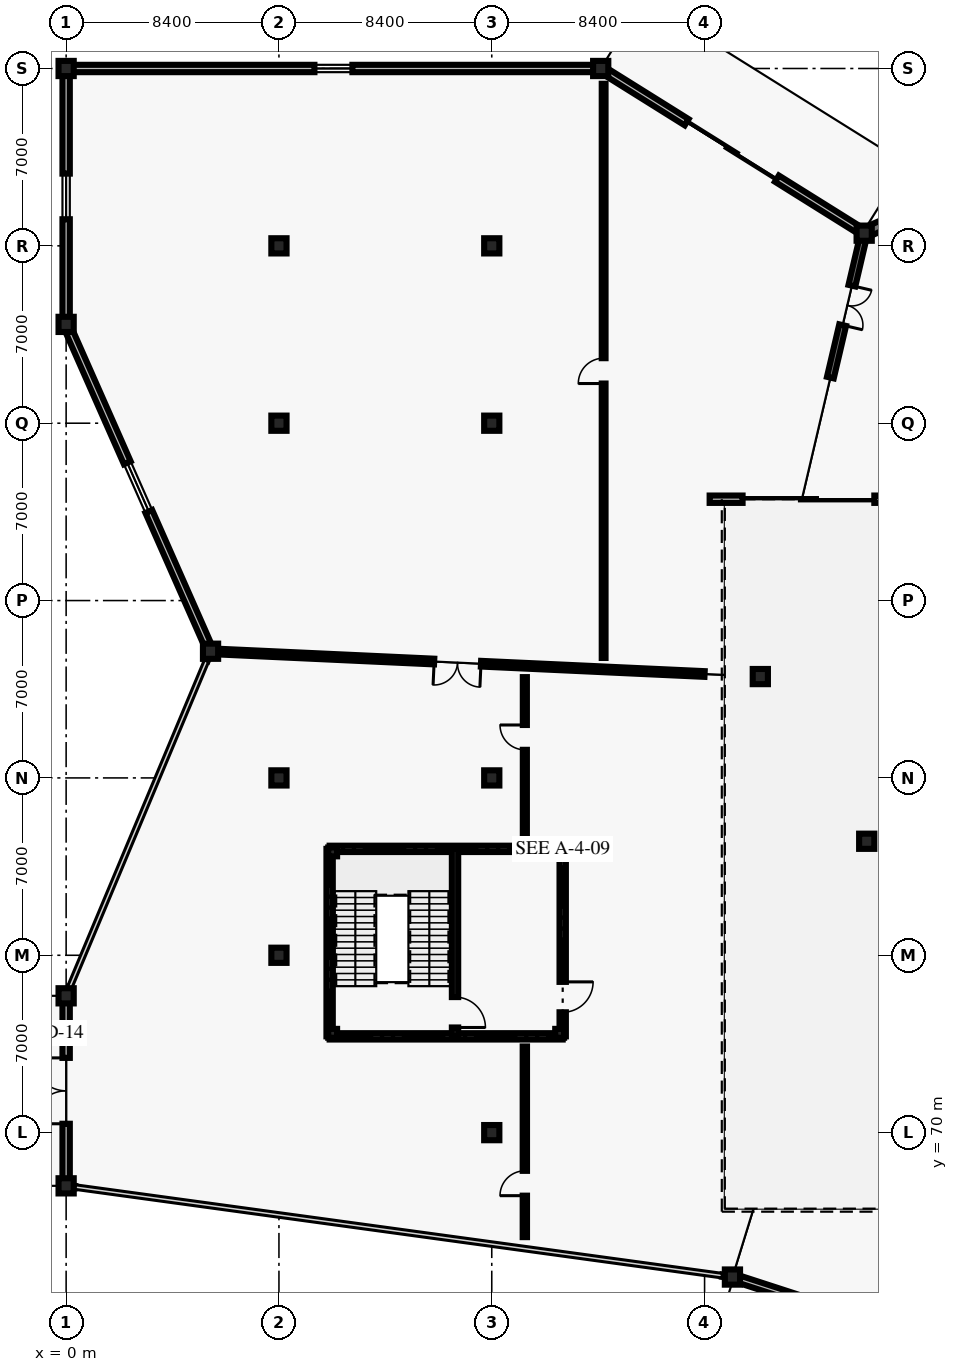
"""IFC4 building model, lengths in metres.
Left out: names, types, materials, properties, quantities, classifications, styles, units other than length and angle.
Written with IfcOpenShell. Run it as: python <this file> out.ifc"""

import sys

from ifc_helpers import new_model, si_unit, direction, frame, frame_2d, origin, origin_2d, place, context, subcontext, project, spatial, rectangle, i_section, extrude, element, fill, save


model = new_model("IFC4")
c1 = context("Model", 3, precision=1e-05, world=origin(), true_north=direction((0.0, 1.0)))
c2 = subcontext(c1, "Body", "Model", "MODEL_VIEW")
j1 = project(units=[si_unit("LENGTHUNIT", "METRE"), si_unit("PLANEANGLEUNIT", "RADIAN")], contexts=[c1])
p1 = place(None, origin())
s1 = spatial("IfcSite", under=j1, at=p1, CompositionType="ELEMENT")
p2 = place(p1, origin())
s2 = spatial("IfcBuilding", under=s1, at=p2, CompositionType="ELEMENT")
p3 = place(p2, origin())
s3 = spatial("IfcBuildingStorey", under=s2, at=p3, CompositionType="ELEMENT", Elevation=0.0)
for number, where, z_axis, x_axis in (
    (1, (0.0, 67.9, 0.0), (0.0, 0.0, 1.0), (1.0, 0.0, 0.0)),
    (2, (0.0, 75.4, 0.0), (0.0, 0.0, 1.0), (1.0, 0.0, 0.0)),
    (3, (0.0, 101.9, 0.0), (0.0, 0.0, 1.0), (1.0, 0.0, 0.0)),
    (4, (0.0, 112.0, 0.0), (0.0, 0.0, 1.0), (1.0, 0.0, 0.0)),
    (5, (5.7, 89.0, 0.0), (0.0, 0.0, 1.0), (1.0, 0.0, 0.0)),
    (6, (21.1, 112.0, 0.0), (0.0, 0.0, 1.0), (1.0, 0.0, 0.0)),
    (7, (26.3, 64.3, 0.0), (0.0, 0.0, 1.0), (1.0, 0.0, 0.0)),
    (8, (27.4, 88.0, 0.0), (0.0, 0.0, 1.0), (1.0, 0.0, 0.0)),
    (9, (31.5, 105.5, 0.0), (0.0, 0.0, 1.0), (1.0, 0.0, 0.0)),
    (10, (31.6, 81.5, 0.0), (0.0, 0.0, 1.0), (1.0, 0.0, 0.0)),
    (11, (8.4, 77.0, 0.0), (0.0, 0.0, 1.0), (1.0, 0.0, 0.0)),
    (12, (8.4, 84.0, 0.0), (0.0, 0.0, 1.0), (1.0, 0.0, 0.0)),
    (13, (16.8, 70.0, 0.0), (0.0, 0.0, 1.0), (1.0, 0.0, 0.0)),
    (14, (16.8, 84.0, 0.0), (0.0, 0.0, 1.0), (1.0, 0.0, 0.0)),
    (15, (8.4, 98.0, 0.0), (0.0, 0.0, 1.0), (1.0, 0.0, 0.0)),
    (16, (8.4, 105.0, 0.0), (0.0, 0.0, 1.0), (1.0, 0.0, 0.0)),
    (17, (16.8, 98.0, 0.0), (0.0, 0.0, 1.0), (1.0, 0.0, 0.0)),
    (18, (16.8, 105.0, 0.0), (0.0, 0.0, 1.0), (1.0, 0.0, 0.0)),
):
    element("IfcColumn", number, at=place(p3, frame(where, z_axis=z_axis, x_axis=x_axis)), inside=s3, PredefinedType="COLUMN", context=c2, shape_type="SweptSolid", body=[
        extrude(rectangle(XDim=0.6, YDim=0.6, at=origin_2d()), origin(), (0.0, 0.0, 1.0), 5.4),
    ])
for number, where, z_axis, x_axis in (
    (19, (10.52, 73.92, 0.0), (0.0, 0.0, 1.0), (1.0, 0.0, 0.0)),
    (20, (19.48, 73.92, 0.0), (0.0, 0.0, 1.0), (1.0, 0.0, 0.0)),
    (21, (19.48, 81.08, 0.0), (0.0, 0.0, 1.0), (1.0, 0.0, 0.0)),
    (22, (10.52, 81.08, 0.0), (0.0, 0.0, 1.0), (1.0, 0.0, 0.0)),
):
    element("IfcColumn", number, at=place(p3, frame(where, z_axis=z_axis, x_axis=x_axis)), inside=s3, PredefinedType="COLUMN", context=c2, shape_type="SweptSolid", body=[
        extrude(i_section(OverallWidth=0.35, OverallDepth=0.35, WebThickness=0.02, FlangeThickness=0.028, at=origin_2d()), origin(), (0.0, 0.0, 1.0), 5.4),
    ])
p4 = place(p3, frame((49.943, 56.619, 0.0), z_axis=(0.0, 0.0, 1.0), x_axis=(-0.951074357174, 0.308962080402, 0.0)))
e23 = element("IfcWall", 23, at=p4, inside=s3, PredefinedType="SOLIDWALL", context=c2, shape_type="SweptSolid", body=[
    extrude(rectangle(XDim=24.8, YDim=0.29, at=frame_2d((12.4, 0.0))), origin(), (0.0, 0.0, 1.0), 4.22),
])
p5 = place(p4, frame((11.124, 0.0, 0.0)))
e24 = element("IfcOpeningElement", 24, at=p5, cuts=e23, PredefinedType="OPENING", context=c2, shape_type="SweptSolid", body=[
    extrude(rectangle(XDim=2.55, YDim=2.5, at=frame_2d((1.275, 1.25))), frame((0.0, 0.155, 0.0), z_axis=(0.0, -1.0, 0.0), x_axis=(1.0, 0.0, 0.0)), (0.0, 0.0, 1.0), 0.31),
])
p6 = place(p3, frame((31.555, 105.524, 0.0), z_axis=(0.0, 0.0, 1.0), x_axis=(0.915561631163, 0.402177696474, 0.0)))
e25 = element("IfcWall", 25, at=p6, inside=s3, PredefinedType="SOLIDWALL", context=c2, shape_type="SweptSolid", body=[
    extrude(rectangle(XDim=11.627, YDim=0.4, at=frame_2d((5.813, 0.0))), origin(), (0.0, 0.0, 1.0), 4.22),
])
p7 = place(p3, frame((0.0, 67.9, 0.0), z_axis=(0.0, 0.0, 1.0), x_axis=(0.0, 1.0, 0.0)))
e26 = element("IfcWall", 26, at=p7, inside=s3, PredefinedType="SOLIDWALL", context=c2, shape_type="SweptSolid", body=[
    extrude(rectangle(XDim=7.5, YDim=0.29, at=frame_2d((3.75, 0.0))), origin(), (0.0, 0.0, 1.0), 4.22),
])
p8 = place(p7, frame((2.45, 0.0, 0.0)))
e27 = element("IfcOpeningElement", 27, at=p8, cuts=e26, PredefinedType="OPENING", context=c2, shape_type="SweptSolid", body=[
    extrude(rectangle(XDim=2.6, YDim=2.55, at=frame_2d((1.3, 1.275))), frame((0.0, 0.155, 0.0), z_axis=(0.0, -1.0, 0.0), x_axis=(1.0, 0.0, 0.0)), (0.0, 0.0, 1.0), 0.31),
])
for number, where, z_axis, x_axis in (
    (28, (26.199, 64.314, 0.0), (0.0, 0.0, 1.0), (-0.991, 0.133, 0.0)),
    (29, (0.347, 67.853, 0.0), (0.0, 0.0, 1.0), (-0.991, 0.133, 0.0)),
):
    element("IfcWall", number, at=place(p3, frame(where, z_axis=z_axis, x_axis=x_axis)), inside=s3, PredefinedType="SOLIDWALL", context=c2, shape_type="SweptSolid", body=[
        extrude(rectangle(XDim=0.308, YDim=0.095, at=frame_2d((0.154, 0.0))), origin(), (0.0, 0.0, 1.0), 4.22),
    ])
for number, where, z_axis, x_axis in (
    (30, (0.016, 75.439, 0.0), (0.0, 0.0, 1.0), (0.386, 0.922, 0.0)),
    (31, (5.542, 88.622, 0.0), (0.0, 0.0, 1.0), (0.386, 0.922, 0.0)),
):
    element("IfcWall", number, at=place(p3, frame(where, z_axis=z_axis, x_axis=x_axis)), inside=s3, PredefinedType="SOLIDWALL", context=c2, shape_type="SweptSolid", body=[
        extrude(rectangle(XDim=0.308, YDim=0.095, at=frame_2d((0.154, 0.0))), origin(), (0.0, 0.0, 1.0), 4.22),
    ])
p9 = place(p3, frame((21.1, 112.0, 0.0), z_axis=(0.0, 0.0, 1.0), x_axis=(0.84799942789, -0.529997141784, 0.0)))
e32 = element("IfcWall", 32, at=p9, inside=s3, PredefinedType="SOLIDWALL", context=c2, shape_type="SweptSolid", body=[
    extrude(rectangle(XDim=12.204, YDim=0.29, at=frame_2d((6.102, 0.0))), origin(), (0.0, 0.0, 1.0), 4.22),
])
p10 = place(p9, frame((4.002, 0.0, 0.0)))
e33 = element("IfcOpeningElement", 33, at=p10, cuts=e32, PredefinedType="OPENING", context=c2, shape_type="SweptSolid", body=[
    extrude(rectangle(XDim=4.2, YDim=3.92, at=frame_2d((2.1, 1.96))), frame((0.0, 0.155, 0.0), z_axis=(0.0, -1.0, 0.0), x_axis=(1.0, 0.0, 0.0)), (0.0, 0.0, 1.0), 0.31),
])
p11 = place(p3, frame((0.0, 112.0, 0.0), z_axis=(0.0, 0.0, 1.0), x_axis=(1.0, 0.0, 0.0)))
e34 = element("IfcWall", 34, at=p11, inside=s3, PredefinedType="SOLIDWALL", context=c2, shape_type="SweptSolid", body=[
    extrude(rectangle(XDim=21.1, YDim=0.29, at=frame_2d((10.55, 0.0))), origin(), (0.0, 0.0, 1.0), 4.22),
])
p12 = place(p11, frame((9.8, 0.0, 0.95)))
e35 = element("IfcOpeningElement", 35, at=p12, cuts=e34, PredefinedType="OPENING", context=c2, shape_type="SweptSolid", body=[
    extrude(rectangle(XDim=1.5, YDim=1.8, at=frame_2d((0.75, 0.9))), frame((0.0, 0.155, 0.0), z_axis=(0.0, -1.0, 0.0), x_axis=(1.0, 0.0, 0.0)), (0.0, 0.0, 1.0), 0.31),
])
p13 = place(p3, frame((0.0, 101.9, 0.0), z_axis=(0.0, 0.0, 1.0), x_axis=(0.0, 1.0, 0.0)))
e36 = element("IfcWall", 36, at=p13, inside=s3, PredefinedType="SOLIDWALL", context=c2, shape_type="SweptSolid", body=[
    extrude(rectangle(XDim=10.1, YDim=0.29, at=frame_2d((5.05, 0.0))), origin(), (0.0, 0.0, 1.0), 4.22),
])
p14 = place(p13, frame((4.15, 0.0, 0.95)))
e37 = element("IfcOpeningElement", 37, at=p14, cuts=e36, PredefinedType="OPENING", context=c2, shape_type="SweptSolid", body=[
    extrude(rectangle(XDim=1.8, YDim=1.8, at=frame_2d((0.9, 0.9))), frame((0.0, 0.155, 0.0), z_axis=(0.0, -1.0, 0.0), x_axis=(1.0, 0.0, 0.0)), (0.0, 0.0, 1.0), 0.31),
])
p15 = place(p3, frame((5.676, 89.055, 0.0), z_axis=(0.0, 0.0, 1.0), x_axis=(-0.404184143846, 0.914677636035, 0.0)))
e38 = element("IfcWall", 38, at=p15, inside=s3, PredefinedType="SOLIDWALL", context=c2, shape_type="SweptSolid", body=[
    extrude(rectangle(XDim=14.043, YDim=0.29, at=frame_2d((7.021, 0.0))), origin(), (0.0, 0.0, 1.0), 4.22),
])
p16 = place(p15, frame((5.971, 0.0, 0.95)))
e39 = element("IfcOpeningElement", 39, at=p16, cuts=e38, PredefinedType="OPENING", context=c2, shape_type="SweptSolid", body=[
    extrude(rectangle(XDim=2.1, YDim=1.8, at=frame_2d((1.05, 0.9))), frame((0.0, 0.155, 0.0), z_axis=(0.0, -1.0, 0.0), x_axis=(1.0, 0.0, 0.0)), (0.0, 0.0, 1.0), 0.31),
])
p17 = place(p3, frame((33.0, 95.0, 0.0), z_axis=(0.0, 0.0, 1.0), x_axis=(-1.0, 0.0, 0.0)))
e40 = element("IfcWall", 40, at=p17, inside=s3, PredefinedType="SOLIDWALL", context=c2, shape_type="SweptSolid", body=[
    extrude(rectangle(XDim=7.6, YDim=0.29, at=frame_2d((3.8, 0.0))), origin(), (0.0, 0.0, 1.0), 3.8),
])
p18 = place(p17, frame((1.1, 0.0, 0.0)))
e41 = element("IfcOpeningElement", 41, at=p18, cuts=e40, PredefinedType="OPENING", context=c2, shape_type="SweptSolid", body=[
    extrude(rectangle(XDim=5.2, YDim=2.8, at=frame_2d((2.6, 1.4))), frame((0.0, 0.155, 0.0), z_axis=(0.0, -1.0, 0.0), x_axis=(1.0, 0.0, 0.0)), (0.0, 0.0, 1.0), 0.31),
])
p19 = place(p3, frame((31.5, 105.5, 0.0), z_axis=(0.0, 0.0, 1.0), x_axis=(-0.228035044918, -0.973652924963, 0.0)))
e42 = element("IfcWall", 42, at=p19, inside=s3, PredefinedType="SOLIDWALL", context=c2, shape_type="SweptSolid", body=[
    extrude(rectangle(XDim=5.854, YDim=0.275, at=frame_2d((2.927, 0.0))), origin(), (0.0, 0.0, 1.0), 4.62),
])
p20 = place(p19, frame((2.127, 0.0, 0.0)))
e43 = element("IfcOpeningElement", 43, at=p20, cuts=e42, PredefinedType="OPENING", context=c2, shape_type="SweptSolid", body=[
    extrude(rectangle(XDim=1.6, YDim=2.45, at=frame_2d((0.8, 1.225))), frame((0.0, 0.147, 0.0), z_axis=(0.0, -1.0, 0.0), x_axis=(1.0, 0.0, 0.0)), (0.0, 0.0, 1.0), 0.295),
])
p21 = place(p3, frame((25.2, 88.101, 0.0), z_axis=(0.0, 0.0, 1.0), x_axis=(-0.998939142773, 0.046049853812, 0.0)))
e44 = element("IfcWall", 44, at=p21, inside=s3, PredefinedType="SOLIDWALL", context=c2, shape_type="SweptSolid", body=[
    extrude(rectangle(XDim=19.521, YDim=0.225, at=frame_2d((9.76, 0.0))), origin(), (0.0, 0.0, 1.0), 4.62),
])
p22 = place(p21, frame((8.835, 0.0, 0.0)))
e45 = element("IfcOpeningElement", 45, at=p22, cuts=e44, PredefinedType="OPENING", context=c2, shape_type="SweptSolid", body=[
    extrude(rectangle(XDim=1.85, YDim=2.4, at=frame_2d((0.925, 1.2))), frame((0.0, 0.123, 0.0), z_axis=(0.0, -1.0, 0.0), x_axis=(1.0, 0.0, 0.0)), (0.0, 0.0, 1.0), 0.245),
])
p23 = place(p3, frame((18.106, 65.876, 0.0), z_axis=(0.0, 0.0, 1.0), x_axis=(0.0, 1.0, 0.0)))
e46 = element("IfcWall", 46, at=p23, inside=s3, PredefinedType="PARTITIONING", context=c2, shape_type="SweptSolid", body=[
    extrude(rectangle(XDim=7.524, YDim=0.17, at=frame_2d((3.762, 0.0))), origin(), (0.0, 0.0, 1.0), 3.92),
])
p24 = place(p23, frame((1.636, 0.0, 0.0)))
e47 = element("IfcOpeningElement", 47, at=p24, cuts=e46, PredefinedType="OPENING", context=c2, shape_type="SweptSolid", body=[
    extrude(rectangle(XDim=0.98, YDim=2.15, at=frame_2d((0.49, 1.075))), frame((0.0, 0.095, 0.0), z_axis=(0.0, -1.0, 0.0), x_axis=(1.0, 0.0, 0.0)), (0.0, 0.0, 1.0), 0.19),
])
p25 = place(p3, frame((18.106, 81.6, 0.0), z_axis=(0.0, 0.0, 1.0), x_axis=(0.0, 1.0, 0.0)))
e48 = element("IfcWall", 48, at=p25, inside=s3, PredefinedType="PARTITIONING", context=c2, shape_type="SweptSolid", body=[
    extrude(rectangle(XDim=6.378, YDim=0.16, at=frame_2d((3.189, 0.0))), origin(), (0.0, 0.0, 1.0), 3.92),
])
p26 = place(p25, frame((3.509, 0.0, 0.0)))
e49 = element("IfcOpeningElement", 49, at=p26, cuts=e48, PredefinedType="OPENING", context=c2, shape_type="SweptSolid", body=[
    extrude(rectangle(XDim=0.98, YDim=2.15, at=frame_2d((0.49, 1.075))), frame((0.0, 0.09, 0.0), z_axis=(0.0, -1.0, 0.0), x_axis=(1.0, 0.0, 0.0)), (0.0, 0.0, 1.0), 0.18),
])
p27 = place(p3, frame((21.216, 88.735, 0.0), z_axis=(0.0, 0.0, 1.0), x_axis=(0.0, 1.0, 0.0)))
e50 = element("IfcWall", 50, at=p27, inside=s3, PredefinedType="PARTITIONING", context=c2, shape_type="SweptSolid", body=[
    extrude(rectangle(XDim=22.662, YDim=0.15, at=frame_2d((11.331, 0.0))), origin(), (0.0, 0.0, 1.0), 3.92),
])
p28 = place(p27, frame((10.831, 0.0, 0.0)))
e51 = element("IfcOpeningElement", 51, at=p28, cuts=e50, PredefinedType="OPENING", context=c2, shape_type="SweptSolid", body=[
    extrude(rectangle(XDim=1.0, YDim=2.15, at=frame_2d((0.5, 1.075))), frame((0.0, 0.085, 0.0), z_axis=(0.0, -1.0, 0.0), x_axis=(1.0, 0.0, 0.0)), (0.0, 0.0, 1.0), 0.17),
])
p29 = place(p3, frame((10.4, 73.8, 0.0), z_axis=(0.0, 0.0, 1.0), x_axis=(0.0, 1.0, 0.0)))
e52 = element("IfcWall", 52, at=p29, inside=s3, PredefinedType="SHEAR", context=c2, shape_type="SweptSolid", body=[
    extrude(rectangle(XDim=7.4, YDim=0.25, at=frame_2d((3.7, 0.0))), origin(), (0.0, 0.0, 1.0), 5.16),
])
for number, where, z_axis, x_axis in (
    (53, (10.4, 81.2, 0.0), (0.0, 0.0, 1.0), (1.0, 0.0, 0.0)),
    (54, (19.6, 73.8, 0.0), (0.0, 0.0, 1.0), (-1.0, 0.0, 0.0)),
):
    element("IfcWall", number, at=place(p3, frame(where, z_axis=z_axis, x_axis=x_axis)), inside=s3, PredefinedType="SHEAR", context=c2, shape_type="SweptSolid", body=[
        extrude(rectangle(XDim=9.2, YDim=0.25, at=frame_2d((4.6, 0.0))), origin(), (0.0, 0.0, 1.0), 5.16),
    ])
p30 = place(p3, frame((19.6, 81.2, 0.0), z_axis=(0.0, 0.0, 1.0), x_axis=(0.0, -1.0, 0.0)))
e55 = element("IfcWall", 55, at=p30, inside=s3, PredefinedType="SHEAR", context=c2, shape_type="SweptSolid", body=[
    extrude(rectangle(XDim=7.4, YDim=0.25, at=frame_2d((3.7, 0.0))), origin(), (0.0, 0.0, 1.0), 5.16),
])
p31 = place(p30, frame((5.25, 0.0, 0.0)))
e56 = element("IfcOpeningElement", 56, at=p31, cuts=e55, PredefinedType="OPENING", context=c2, shape_type="SweptSolid", body=[
    extrude(rectangle(XDim=1.2, YDim=2.2, at=frame_2d((0.6, 1.1))), frame((0.0, 0.135, 0.0), z_axis=(0.0, -1.0, 0.0), x_axis=(1.0, 0.0, 0.0)), (0.0, 0.0, 1.0), 0.27),
])
p32 = place(p3, frame((15.35, 81.2, 0.0), z_axis=(0.0, 0.0, 1.0), x_axis=(0.0, -1.0, 0.0)))
e57 = element("IfcWall", 57, at=p32, inside=s3, PredefinedType="SHEAR", context=c2, shape_type="SweptSolid", body=[
    extrude(rectangle(XDim=7.4, YDim=0.25, at=frame_2d((3.7, 0.0))), origin(), (0.0, 0.0, 1.0), 5.16),
])
p33 = place(p32, frame((5.85, 0.0, 0.0)))
e58 = element("IfcOpeningElement", 58, at=p33, cuts=e57, PredefinedType="OPENING", context=c2, shape_type="SweptSolid", body=[
    extrude(rectangle(XDim=1.2, YDim=2.2, at=frame_2d((0.6, 1.1))), frame((0.0, 0.135, 0.0), z_axis=(0.0, -1.0, 0.0), x_axis=(1.0, 0.0, 0.0)), (0.0, 0.0, 1.0), 0.27),
])
p34 = place(p8, origin())
e59 = element("IfcDoor", 59, at=p34, inside=s3, OperationType="DOUBLE_DOOR_SINGLE_SWING", PredefinedType="DOOR", context=c2, shape_type="SweptSolid", body=[
    extrude(rectangle(XDim=2.6, YDim=2.55, at=frame_2d((1.3, 1.275))), frame((0.0, 0.025, 0.0), z_axis=(0.0, -1.0, 0.0), x_axis=(1.0, 0.0, 0.0)), (0.0, 0.0, 1.0), 0.05),
])
fill(e27, e59)
p35 = place(p10, origin())
e60 = element("IfcDoor", 60, at=p35, inside=s3, OperationType="ROLLINGUP", PredefinedType="GATE", context=c2, shape_type="SweptSolid", body=[
    extrude(rectangle(XDim=4.2, YDim=3.92, at=frame_2d((2.1, 1.96))), frame((0.0, 0.025, 0.0), z_axis=(0.0, -1.0, 0.0), x_axis=(1.0, 0.0, 0.0)), (0.0, 0.0, 1.0), 0.05),
])
fill(e33, e60)
p36 = place(p12, origin())
e61 = element("IfcWindow", 61, at=p36, inside=s3, PartitioningType="SINGLE_PANEL", PredefinedType="WINDOW", context=c2, shape_type="SweptSolid", body=[
    extrude(rectangle(XDim=1.5, YDim=1.8, at=frame_2d((0.75, 0.9))), frame((0.0, 0.03, 0.0), z_axis=(0.0, -1.0, 0.0), x_axis=(1.0, 0.0, 0.0)), (0.0, 0.0, 1.0), 0.06),
])
fill(e35, e61)
p37 = place(p14, origin())
e62 = element("IfcWindow", 62, at=p37, inside=s3, PartitioningType="SINGLE_PANEL", PredefinedType="WINDOW", context=c2, shape_type="SweptSolid", body=[
    extrude(rectangle(XDim=1.8, YDim=1.8, at=frame_2d((0.9, 0.9))), frame((0.0, 0.03, 0.0), z_axis=(0.0, -1.0, 0.0), x_axis=(1.0, 0.0, 0.0)), (0.0, 0.0, 1.0), 0.06),
])
fill(e37, e62)
p38 = place(p16, origin())
e63 = element("IfcWindow", 63, at=p38, inside=s3, PartitioningType="SINGLE_PANEL", PredefinedType="WINDOW", context=c2, shape_type="SweptSolid", body=[
    extrude(rectangle(XDim=2.1, YDim=1.8, at=frame_2d((1.05, 0.9))), frame((0.0, 0.03, 0.0), z_axis=(0.0, -1.0, 0.0), x_axis=(1.0, 0.0, 0.0)), (0.0, 0.0, 1.0), 0.06),
])
fill(e39, e63)
p39 = place(p18, origin())
e64 = element("IfcDoor", 64, at=p39, inside=s3, OperationType="ROLLINGUP", PredefinedType="GATE", context=c2, shape_type="SweptSolid", body=[
    extrude(rectangle(XDim=5.2, YDim=2.8, at=frame_2d((2.6, 1.4))), frame((0.0, 0.025, 0.0), z_axis=(0.0, -1.0, 0.0), x_axis=(1.0, 0.0, 0.0)), (0.0, 0.0, 1.0), 0.05),
])
fill(e41, e64)
p40 = place(p20, origin())
e65 = element("IfcDoor", 65, at=p40, inside=s3, OperationType="DOUBLE_DOOR_SINGLE_SWING", PredefinedType="DOOR", context=c2, shape_type="SweptSolid", body=[
    extrude(rectangle(XDim=1.6, YDim=2.45, at=frame_2d((0.8, 1.225))), frame((0.0, 0.025, 0.0), z_axis=(0.0, -1.0, 0.0), x_axis=(1.0, 0.0, 0.0)), (0.0, 0.0, 1.0), 0.05),
])
fill(e43, e65)
p41 = place(p22, origin())
e66 = element("IfcDoor", 66, at=p41, inside=s3, OperationType="DOUBLE_DOOR_SINGLE_SWING", PredefinedType="DOOR", context=c2, shape_type="SweptSolid", body=[
    extrude(rectangle(XDim=1.85, YDim=2.4, at=frame_2d((0.925, 1.2))), frame((0.0, 0.025, 0.0), z_axis=(0.0, -1.0, 0.0), x_axis=(1.0, 0.0, 0.0)), (0.0, 0.0, 1.0), 0.05),
])
fill(e45, e66)
p42 = place(p24, origin())
e67 = element("IfcDoor", 67, at=p42, inside=s3, OperationType="SINGLE_SWING_LEFT", PredefinedType="DOOR", context=c2, shape_type="SweptSolid", body=[
    extrude(rectangle(XDim=0.98, YDim=2.15, at=frame_2d((0.49, 1.075))), frame((0.0, 0.025, 0.0), z_axis=(0.0, -1.0, 0.0), x_axis=(1.0, 0.0, 0.0)), (0.0, 0.0, 1.0), 0.05),
])
fill(e47, e67)
p43 = place(p26, origin())
e68 = element("IfcDoor", 68, at=p43, inside=s3, OperationType="SINGLE_SWING_RIGHT", PredefinedType="DOOR", context=c2, shape_type="SweptSolid", body=[
    extrude(rectangle(XDim=0.98, YDim=2.15, at=frame_2d((0.49, 1.075))), frame((0.0, 0.025, 0.0), z_axis=(0.0, -1.0, 0.0), x_axis=(1.0, 0.0, 0.0)), (0.0, 0.0, 1.0), 0.05),
])
fill(e49, e68)
p44 = place(p28, origin())
e69 = element("IfcDoor", 69, at=p44, inside=s3, OperationType="SINGLE_SWING_LEFT", PredefinedType="DOOR", context=c2, shape_type="SweptSolid", body=[
    extrude(rectangle(XDim=1.0, YDim=2.15, at=frame_2d((0.5, 1.075))), frame((0.0, 0.025, 0.0), z_axis=(0.0, -1.0, 0.0), x_axis=(1.0, 0.0, 0.0)), (0.0, 0.0, 1.0), 0.05),
])
fill(e51, e69)
p45 = place(p31, origin())
e70 = element("IfcDoor", 70, at=p45, inside=s3, OperationType="SINGLE_SWING_LEFT", PredefinedType="DOOR", context=c2, shape_type="SweptSolid", body=[
    extrude(rectangle(XDim=1.2, YDim=2.2, at=frame_2d((0.6, 1.1))), frame((0.0, 0.025, 0.0), z_axis=(0.0, -1.0, 0.0), x_axis=(1.0, 0.0, 0.0)), (0.0, 0.0, 1.0), 0.05),
])
fill(e56, e70)
p46 = place(p33, origin())
e71 = element("IfcDoor", 71, at=p46, inside=s3, OperationType="SINGLE_SWING_RIGHT", PredefinedType="DOOR", context=c2, shape_type="SweptSolid", body=[
    extrude(rectangle(XDim=1.2, YDim=2.2, at=frame_2d((0.6, 1.1))), frame((0.0, 0.025, 0.0), z_axis=(0.0, -1.0, 0.0), x_axis=(1.0, 0.0, 0.0)), (0.0, 0.0, 1.0), 0.05),
])
fill(e58, e71)
save(model, sys.argv[1])
